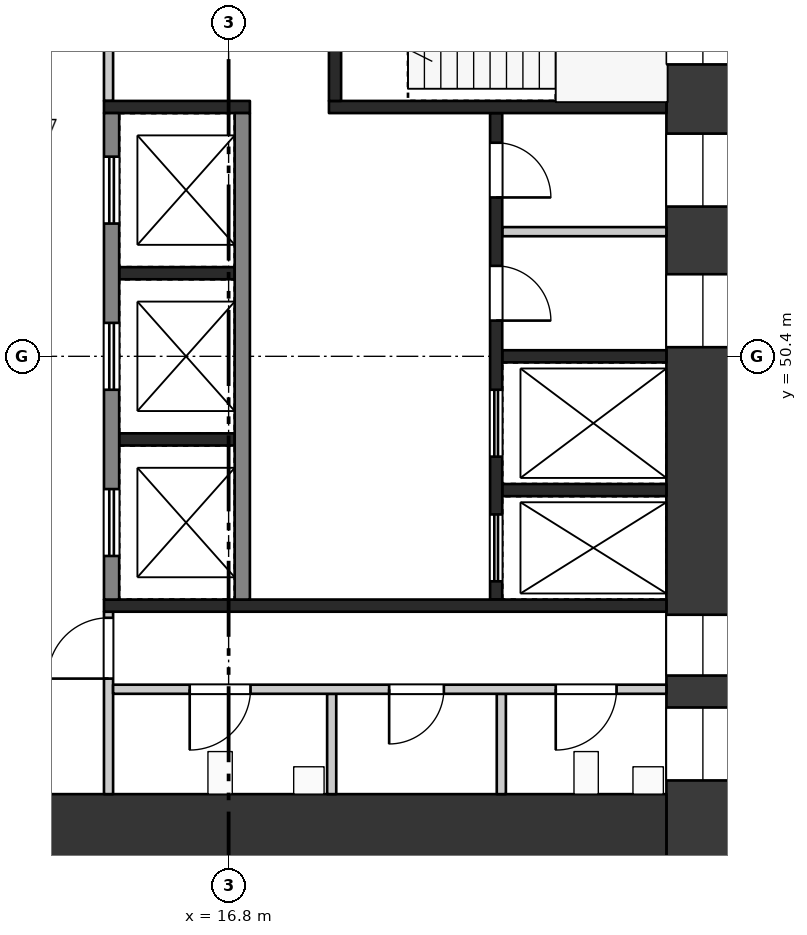
"""IFC4 building model, lengths in metres.
Left out: names, types, materials, properties, quantities, classifications, styles, units other than length and angle.
Written with IfcOpenShell. Run it as: python <this file> out.ifc"""

import sys

from ifc_helpers import new_model, si_unit, direction, frame, frame_2d, origin, place, context, subcontext, project, spatial, rectangle, extrude, element, fill, save


model = new_model("IFC4")
c1 = context("Model", 3, precision=1e-05, world=origin(), true_north=direction((0.0, 1.0)))
c2 = subcontext(c1, "Body", "Model", "MODEL_VIEW")
j1 = project(units=[si_unit("LENGTHUNIT", "METRE"), si_unit("PLANEANGLEUNIT", "RADIAN")], contexts=[c1])
p1 = place(None, origin())
s1 = spatial("IfcSite", under=j1, at=p1, CompositionType="ELEMENT")
p2 = place(p1, origin())
s2 = spatial("IfcBuilding", under=s1, at=p2, CompositionType="ELEMENT")
p3 = place(p2, frame((0.0, 0.0, 224.7)))
s3 = spatial("IfcBuildingStorey", under=s2, at=p3, CompositionType="ELEMENT", Elevation=224.7)
p4 = place(p3, frame((24.6, 58.8, 0.0), z_axis=(0.0, 0.0, 1.0), x_axis=(0.0, -1.0, 0.0)))
e1 = element("IfcWall", 1, at=p4, inside=s3, PredefinedType="SHEAR", context=c2, shape_type="SweptSolid", body=[
    extrude(rectangle(XDim=16.8, YDim=1.2, at=frame_2d((8.4, 0.0))), origin(), (0.0, 0.0, 1.0), 3.22),
])
p5 = place(p4, frame((1.8, 0.0, 0.5)))
e2 = element("IfcOpeningElement", 2, at=p5, cuts=e1, PredefinedType="OPENING", context=c2, shape_type="SweptSolid", body=[
    extrude(rectangle(XDim=1.8, YDim=2.4, at=frame_2d((0.9, 1.2))), frame((0.0, 0.61, 0.0), z_axis=(0.0, -1.0, 0.0), x_axis=(1.0, 0.0, 0.0)), (0.0, 0.0, 1.0), 1.22),
])
p6 = place(p4, frame((4.738, 0.0, 1.6)))
e3 = element("IfcOpeningElement", 3, at=p6, cuts=e1, PredefinedType="OPENING", context=c2, shape_type="SweptSolid", body=[
    extrude(rectangle(XDim=1.2, YDim=1.2, at=frame_2d((0.6, 0.6))), frame((0.0, 0.61, 0.0), z_axis=(0.0, -1.0, 0.0), x_axis=(1.0, 0.0, 0.0)), (0.0, 0.0, 1.0), 1.22),
])
p7 = place(p4, frame((7.05, 0.0, 1.6)))
e4 = element("IfcOpeningElement", 4, at=p7, cuts=e1, PredefinedType="OPENING", context=c2, shape_type="SweptSolid", body=[
    extrude(rectangle(XDim=1.2, YDim=1.2, at=frame_2d((0.6, 0.6))), frame((0.0, 0.61, 0.0), z_axis=(0.0, -1.0, 0.0), x_axis=(1.0, 0.0, 0.0)), (0.0, 0.0, 1.0), 1.22),
])
p8 = place(p4, frame((12.65, 0.0, 0.6)))
e5 = element("IfcOpeningElement", 5, at=p8, cuts=e1, PredefinedType="OPENING", context=c2, shape_type="SweptSolid", body=[
    extrude(rectangle(XDim=1.0, YDim=2.1, at=frame_2d((0.5, 1.05))), frame((0.0, 0.61, 0.0), z_axis=(0.0, -1.0, 0.0), x_axis=(1.0, 0.0, 0.0)), (0.0, 0.0, 1.0), 1.22),
])
p9 = place(p4, frame((14.175, 0.0, 1.6)))
e6 = element("IfcOpeningElement", 6, at=p9, cuts=e1, PredefinedType="OPENING", context=c2, shape_type="SweptSolid", body=[
    extrude(rectangle(XDim=1.2, YDim=1.2, at=frame_2d((0.6, 0.6))), frame((0.0, 0.61, 0.0), z_axis=(0.0, -1.0, 0.0), x_axis=(1.0, 0.0, 0.0)), (0.0, 0.0, 1.0), 1.22),
])
p10 = place(p3, frame((9.6, 42.6, 0.0), z_axis=(0.0, 0.0, 1.0), x_axis=(1.0, 0.0, 0.0)))
e7 = element("IfcWall", 7, at=p10, inside=s3, PredefinedType="SHEAR", context=c2, shape_type="SweptSolid", body=[
    extrude(rectangle(XDim=14.4, YDim=1.2, at=frame_2d((7.2, 0.0))), origin(), (0.0, 0.0, 1.0), 3.22),
])
p11 = place(p10, frame((2.1, 0.0, 0.0)))
e8 = element("IfcOpeningElement", 8, at=p11, cuts=e7, PredefinedType="OPENING", context=c2, shape_type="SweptSolid", body=[
    extrude(rectangle(XDim=1.8, YDim=2.1, at=frame_2d((0.9, 1.05))), frame((0.0, 0.61, 0.0), z_axis=(0.0, -1.0, 0.0), x_axis=(1.0, 0.0, 0.0)), (0.0, 0.0, 1.0), 1.22),
])
for number, where, z_axis, x_axis in (
    (9, (15.0, 51.767, 0.0), (0.0, 0.0, 1.0), (1.0, 0.0, 0.0)),
    (10, (15.0, 49.033, 0.0), (0.0, 0.0, 1.0), (1.0, 0.0, 0.0)),
):
    element("IfcWall", number, at=place(p3, frame(where, z_axis=z_axis, x_axis=x_axis)), inside=s3, PredefinedType="SHEAR", context=c2, shape_type="SweptSolid", body=[
        extrude(rectangle(XDim=1.9, YDim=0.2, at=frame_2d((0.95, 0.0))), origin(), (0.0, 0.0, 1.0), 3.22),
    ])
p12 = place(p3, frame((14.875, 54.4, 0.0), z_axis=(0.0, 0.0, 1.0), x_axis=(0.0, -1.0, 0.0)))
e11 = element("IfcWall", 11, at=p12, inside=s3, PredefinedType="SHEAR", context=c2, shape_type="SweptSolid", body=[
    extrude(rectangle(XDim=8.0, YDim=0.25, at=frame_2d((4.0, 0.0))), origin(), (0.0, 0.0, 1.0), 3.22),
])
p13 = place(p12, frame((0.717, 0.0, 0.0)))
e12 = element("IfcOpeningElement", 12, at=p13, cuts=e11, PredefinedType="OPENING", context=c2, shape_type="SweptSolid", body=[
    extrude(rectangle(XDim=1.1, YDim=2.1, at=frame_2d((0.55, 1.05))), frame((0.0, 0.135, 0.0), z_axis=(0.0, -1.0, 0.0), x_axis=(1.0, 0.0, 0.0)), (0.0, 0.0, 1.0), 0.27),
])
p14 = place(p12, frame((3.45, 0.0, 0.0)))
e13 = element("IfcOpeningElement", 13, at=p14, cuts=e11, PredefinedType="OPENING", context=c2, shape_type="SweptSolid", body=[
    extrude(rectangle(XDim=1.1, YDim=2.1, at=frame_2d((0.55, 1.05))), frame((0.0, 0.135, 0.0), z_axis=(0.0, -1.0, 0.0), x_axis=(1.0, 0.0, 0.0)), (0.0, 0.0, 1.0), 0.27),
])
p15 = place(p12, frame((6.183, 0.0, 0.0)))
e14 = element("IfcOpeningElement", 14, at=p15, cuts=e11, PredefinedType="OPENING", context=c2, shape_type="SweptSolid", body=[
    extrude(rectangle(XDim=1.1, YDim=2.1, at=frame_2d((0.55, 1.05))), frame((0.0, 0.135, 0.0), z_axis=(0.0, -1.0, 0.0), x_axis=(1.0, 0.0, 0.0)), (0.0, 0.0, 1.0), 0.27),
])
p16 = place(p3, frame((17.025, 54.4, 0.0), z_axis=(0.0, 0.0, 1.0), x_axis=(0.0, -1.0, 0.0)))
e15 = element("IfcWall", 15, at=p16, inside=s3, PredefinedType="SHEAR", context=c2, shape_type="SweptSolid", body=[
    extrude(rectangle(XDim=8.0, YDim=0.25, at=frame_2d((4.0, 0.0))), origin(), (0.0, 0.0, 1.0), 3.22),
])
for number, where, z_axis, x_axis in (
    (16, (21.3, 50.4, 0.0), (0.0, 0.0, 1.0), (1.0, 0.0, 0.0)),
    (17, (21.3, 48.2, 0.0), (0.0, 0.0, 1.0), (1.0, 0.0, 0.0)),
):
    element("IfcWall", number, at=place(p3, frame(where, z_axis=z_axis, x_axis=x_axis)), inside=s3, PredefinedType="SHEAR", context=c2, shape_type="SweptSolid", body=[
        extrude(rectangle(XDim=2.7, YDim=0.2, at=frame_2d((1.35, 0.0))), origin(), (0.0, 0.0, 1.0), 3.22),
    ])
p17 = place(p3, frame((21.3, 52.45, 0.0), z_axis=(0.0, 0.0, 1.0), x_axis=(1.0, 0.0, 0.0)))
e18 = element("IfcWall", 18, at=p17, inside=s3, PredefinedType="PARTITIONING", context=c2, shape_type="SweptSolid", body=[
    extrude(rectangle(XDim=2.7, YDim=0.15, at=frame_2d((1.35, 0.0))), origin(), (0.0, 0.0, 1.0), 3.22),
])
p18 = place(p3, frame((21.2, 54.4, 0.0), z_axis=(0.0, 0.0, 1.0), x_axis=(0.0, -1.0, 0.0)))
e19 = element("IfcWall", 19, at=p18, inside=s3, PredefinedType="SHEAR", context=c2, shape_type="SweptSolid", body=[
    extrude(rectangle(XDim=8.0, YDim=0.2, at=frame_2d((4.0, 0.0))), origin(), (0.0, 0.0, 1.0), 3.22),
])
p19 = place(p18, frame((0.488, 0.0, 0.0)))
e20 = element("IfcOpeningElement", 20, at=p19, cuts=e19, PredefinedType="OPENING", context=c2, shape_type="SweptSolid", body=[
    extrude(rectangle(XDim=0.9, YDim=2.1, at=frame_2d((0.45, 1.05))), frame((0.0, 0.11, 0.0), z_axis=(0.0, -1.0, 0.0), x_axis=(1.0, 0.0, 0.0)), (0.0, 0.0, 1.0), 0.22),
])
p20 = place(p18, frame((2.512, 0.0, 0.0)))
e21 = element("IfcOpeningElement", 21, at=p20, cuts=e19, PredefinedType="OPENING", context=c2, shape_type="SweptSolid", body=[
    extrude(rectangle(XDim=0.9, YDim=2.1, at=frame_2d((0.45, 1.05))), frame((0.0, 0.11, 0.0), z_axis=(0.0, -1.0, 0.0), x_axis=(1.0, 0.0, 0.0)), (0.0, 0.0, 1.0), 0.22),
])
p21 = place(p18, frame((4.55, 0.0, 0.0)))
e22 = element("IfcOpeningElement", 22, at=p21, cuts=e19, PredefinedType="OPENING", context=c2, shape_type="SweptSolid", body=[
    extrude(rectangle(XDim=1.1, YDim=2.1, at=frame_2d((0.55, 1.05))), frame((0.0, 0.11, 0.0), z_axis=(0.0, -1.0, 0.0), x_axis=(1.0, 0.0, 0.0)), (0.0, 0.0, 1.0), 0.22),
])
p22 = place(p18, frame((6.6, 0.0, 0.0)))
e23 = element("IfcOpeningElement", 23, at=p22, cuts=e19, PredefinedType="OPENING", context=c2, shape_type="SweptSolid", body=[
    extrude(rectangle(XDim=1.1, YDim=2.1, at=frame_2d((0.55, 1.05))), frame((0.0, 0.11, 0.0), z_axis=(0.0, -1.0, 0.0), x_axis=(1.0, 0.0, 0.0)), (0.0, 0.0, 1.0), 0.22),
])
p23 = place(p3, frame((14.75, 54.5, 0.0), z_axis=(0.0, 0.0, 1.0), x_axis=(1.0, 0.0, 0.0)))
e24 = element("IfcWall", 24, at=p23, inside=s3, PredefinedType="SHEAR", context=c2, shape_type="SweptSolid", body=[
    extrude(rectangle(XDim=2.4, YDim=0.2, at=frame_2d((1.2, 0.0))), origin(), (0.0, 0.0, 1.0), 3.22),
])
p24 = place(p3, frame((18.45, 54.5, 0.0), z_axis=(0.0, 0.0, 1.0), x_axis=(1.0, 0.0, 0.0)))
e25 = element("IfcWall", 25, at=p24, inside=s3, PredefinedType="SHEAR", context=c2, shape_type="SweptSolid", body=[
    extrude(rectangle(XDim=5.55, YDim=0.2, at=frame_2d((2.775, 0.0))), origin(), (0.0, 0.0, 1.0), 3.22),
])
p25 = place(p3, frame((14.825, 57.6, 0.0), z_axis=(0.0, 0.0, 1.0), x_axis=(0.0, -1.0, 0.0)))
e26 = element("IfcWall", 26, at=p25, inside=s3, PredefinedType="PARTITIONING", context=c2, shape_type="SweptSolid", body=[
    extrude(rectangle(XDim=3.0, YDim=0.15, at=frame_2d((1.5, 0.0))), origin(), (0.0, 0.0, 1.0), 3.22),
])
p26 = place(p25, frame((1.0, 0.0, 0.0)))
e27 = element("IfcOpeningElement", 27, at=p26, cuts=e26, PredefinedType="OPENING", context=c2, shape_type="SweptSolid", body=[
    extrude(rectangle(XDim=1.0, YDim=2.1, at=frame_2d((0.5, 1.05))), frame((0.0, 0.085, 0.0), z_axis=(0.0, -1.0, 0.0), x_axis=(1.0, 0.0, 0.0)), (0.0, 0.0, 1.0), 0.17),
])
p27 = place(p3, frame((18.55, 57.6, 0.0), z_axis=(0.0, 0.0, 1.0), x_axis=(0.0, -1.0, 0.0)))
e28 = element("IfcWall", 28, at=p27, inside=s3, PredefinedType="SHEAR", context=c2, shape_type="SweptSolid", body=[
    extrude(rectangle(XDim=3.0, YDim=0.2, at=frame_2d((1.5, 0.0))), origin(), (0.0, 0.0, 1.0), 3.22),
])
p28 = place(p27, frame((1.0, 0.0, 0.0)))
e29 = element("IfcOpeningElement", 29, at=p28, cuts=e28, PredefinedType="OPENING", context=c2, shape_type="SweptSolid", body=[
    extrude(rectangle(XDim=1.0, YDim=2.1, at=frame_2d((0.5, 1.05))), frame((0.0, 0.11, 0.0), z_axis=(0.0, -1.0, 0.0), x_axis=(1.0, 0.0, 0.0)), (0.0, 0.0, 1.0), 0.22),
])
p29 = place(p3, frame((14.75, 46.3, 0.0), z_axis=(0.0, 0.0, 1.0), x_axis=(1.0, 0.0, 0.0)))
e30 = element("IfcWall", 30, at=p29, inside=s3, PredefinedType="SHEAR", context=c2, shape_type="SweptSolid", body=[
    extrude(rectangle(XDim=9.25, YDim=0.2, at=frame_2d((4.625, 0.0))), origin(), (0.0, 0.0, 1.0), 3.22),
])
p30 = place(p3, frame((14.825, 46.2, 0.0), z_axis=(0.0, 0.0, 1.0), x_axis=(0.0, -1.0, 0.0)))
e31 = element("IfcWall", 31, at=p30, inside=s3, PredefinedType="PARTITIONING", context=c2, shape_type="SweptSolid", body=[
    extrude(rectangle(XDim=3.0, YDim=0.15, at=frame_2d((1.5, 0.0))), origin(), (0.0, 0.0, 1.0), 3.22),
])
p31 = place(p30, frame((0.1, 0.0, 0.0)))
e32 = element("IfcOpeningElement", 32, at=p31, cuts=e31, PredefinedType="OPENING", context=c2, shape_type="SweptSolid", body=[
    extrude(rectangle(XDim=1.0, YDim=2.1, at=frame_2d((0.5, 1.05))), frame((0.0, 0.085, 0.0), z_axis=(0.0, -1.0, 0.0), x_axis=(1.0, 0.0, 0.0)), (0.0, 0.0, 1.0), 0.17),
])
for number, where, z_axis, x_axis in (
    (33, (18.495, 44.85, 0.0), (0.0, 0.0, 1.0), (0.0, -1.0, 0.0)),
    (34, (21.285, 44.85, 0.0), (0.0, 0.0, 1.0), (0.0, -1.0, 0.0)),
):
    element("IfcWall", number, at=place(p3, frame(where, z_axis=z_axis, x_axis=x_axis)), inside=s3, PredefinedType="PARTITIONING", context=c2, shape_type="SweptSolid", body=[
        extrude(rectangle(XDim=1.65, YDim=0.15, at=frame_2d((0.825, 0.0))), origin(), (0.0, 0.0, 1.0), 3.22),
    ])
p32 = place(p3, frame((14.9, 44.925, 0.0), z_axis=(0.0, 0.0, 1.0), x_axis=(1.0, 0.0, 0.0)))
e35 = element("IfcWall", 35, at=p32, inside=s3, PredefinedType="PARTITIONING", context=c2, shape_type="SweptSolid", body=[
    extrude(rectangle(XDim=9.1, YDim=0.15, at=frame_2d((4.55, 0.0))), origin(), (0.0, 0.0, 1.0), 3.22),
])
p33 = place(p32, frame((1.26, 0.0, 0.0)))
e36 = element("IfcOpeningElement", 36, at=p33, cuts=e35, PredefinedType="OPENING", context=c2, shape_type="SweptSolid", body=[
    extrude(rectangle(XDim=1.0, YDim=2.1, at=frame_2d((0.5, 1.05))), frame((0.0, 0.085, 0.0), z_axis=(0.0, -1.0, 0.0), x_axis=(1.0, 0.0, 0.0)), (0.0, 0.0, 1.0), 0.17),
])
p34 = place(p32, frame((4.54, 0.0, 0.0)))
e37 = element("IfcOpeningElement", 37, at=p34, cuts=e35, PredefinedType="OPENING", context=c2, shape_type="SweptSolid", body=[
    extrude(rectangle(XDim=0.9, YDim=2.1, at=frame_2d((0.45, 1.05))), frame((0.0, 0.085, 0.0), z_axis=(0.0, -1.0, 0.0), x_axis=(1.0, 0.0, 0.0)), (0.0, 0.0, 1.0), 0.17),
])
p35 = place(p32, frame((7.28, 0.0, 0.0)))
e38 = element("IfcOpeningElement", 38, at=p35, cuts=e35, PredefinedType="OPENING", context=c2, shape_type="SweptSolid", body=[
    extrude(rectangle(XDim=1.0, YDim=2.1, at=frame_2d((0.5, 1.05))), frame((0.0, 0.085, 0.0), z_axis=(0.0, -1.0, 0.0), x_axis=(1.0, 0.0, 0.0)), (0.0, 0.0, 1.0), 0.17),
])
p36 = place(p13, origin())
e39 = element("IfcDoor", 39, at=p36, inside=s3, OperationType="DOUBLE_DOOR_SLIDING", PredefinedType="DOOR", context=c2, shape_type="SweptSolid", body=[
    extrude(rectangle(XDim=1.1, YDim=2.1, at=frame_2d((0.55, 1.05))), frame((0.0, 0.025, 0.0), z_axis=(0.0, -1.0, 0.0), x_axis=(1.0, 0.0, 0.0)), (0.0, 0.0, 1.0), 0.05),
])
fill(e12, e39)
p37 = place(p14, origin())
e40 = element("IfcDoor", 40, at=p37, inside=s3, OperationType="DOUBLE_DOOR_SLIDING", PredefinedType="DOOR", context=c2, shape_type="SweptSolid", body=[
    extrude(rectangle(XDim=1.1, YDim=2.1, at=frame_2d((0.55, 1.05))), frame((0.0, 0.025, 0.0), z_axis=(0.0, -1.0, 0.0), x_axis=(1.0, 0.0, 0.0)), (0.0, 0.0, 1.0), 0.05),
])
fill(e13, e40)
p38 = place(p15, origin())
e41 = element("IfcDoor", 41, at=p38, inside=s3, OperationType="DOUBLE_DOOR_SLIDING", PredefinedType="DOOR", context=c2, shape_type="SweptSolid", body=[
    extrude(rectangle(XDim=1.1, YDim=2.1, at=frame_2d((0.55, 1.05))), frame((0.0, 0.025, 0.0), z_axis=(0.0, -1.0, 0.0), x_axis=(1.0, 0.0, 0.0)), (0.0, 0.0, 1.0), 0.05),
])
fill(e14, e41)
p39 = place(p19, origin())
e42 = element("IfcDoor", 42, at=p39, inside=s3, OperationType="SINGLE_SWING_RIGHT", PredefinedType="DOOR", context=c2, shape_type="SweptSolid", body=[
    extrude(rectangle(XDim=0.9, YDim=2.1, at=frame_2d((0.45, 1.05))), frame((0.0, 0.025, 0.0), z_axis=(0.0, -1.0, 0.0), x_axis=(1.0, 0.0, 0.0)), (0.0, 0.0, 1.0), 0.05),
])
fill(e20, e42)
p40 = place(p20, origin())
e43 = element("IfcDoor", 43, at=p40, inside=s3, OperationType="SINGLE_SWING_RIGHT", PredefinedType="DOOR", context=c2, shape_type="SweptSolid", body=[
    extrude(rectangle(XDim=0.9, YDim=2.1, at=frame_2d((0.45, 1.05))), frame((0.0, 0.025, 0.0), z_axis=(0.0, -1.0, 0.0), x_axis=(1.0, 0.0, 0.0)), (0.0, 0.0, 1.0), 0.05),
])
fill(e21, e43)
p41 = place(p21, origin())
e44 = element("IfcDoor", 44, at=p41, inside=s3, OperationType="DOUBLE_DOOR_SLIDING", PredefinedType="DOOR", context=c2, shape_type="SweptSolid", body=[
    extrude(rectangle(XDim=1.1, YDim=2.1, at=frame_2d((0.55, 1.05))), frame((0.0, 0.025, 0.0), z_axis=(0.0, -1.0, 0.0), x_axis=(1.0, 0.0, 0.0)), (0.0, 0.0, 1.0), 0.05),
])
fill(e22, e44)
p42 = place(p22, origin())
e45 = element("IfcDoor", 45, at=p42, inside=s3, OperationType="DOUBLE_DOOR_SLIDING", PredefinedType="DOOR", context=c2, shape_type="SweptSolid", body=[
    extrude(rectangle(XDim=1.1, YDim=2.1, at=frame_2d((0.55, 1.05))), frame((0.0, 0.025, 0.0), z_axis=(0.0, -1.0, 0.0), x_axis=(1.0, 0.0, 0.0)), (0.0, 0.0, 1.0), 0.05),
])
fill(e23, e45)
p43 = place(p31, frame((1.0, 0.0, 0.0), z_axis=(0.0, 0.0, 1.0), x_axis=(-1.0, 0.0, 0.0)))
e46 = element("IfcDoor", 46, at=p43, inside=s3, OperationType="SINGLE_SWING_LEFT", PredefinedType="DOOR", context=c2, shape_type="SweptSolid", body=[
    extrude(rectangle(XDim=1.0, YDim=2.1, at=frame_2d((0.5, 1.05))), frame((0.0, 0.025, 0.0), z_axis=(0.0, -1.0, 0.0), x_axis=(1.0, 0.0, 0.0)), (0.0, 0.0, 1.0), 0.05),
])
fill(e32, e46)
p44 = place(p33, frame((1.0, 0.0, 0.0), z_axis=(0.0, 0.0, 1.0), x_axis=(-1.0, 0.0, 0.0)))
e47 = element("IfcDoor", 47, at=p44, inside=s3, OperationType="SINGLE_SWING_RIGHT", PredefinedType="DOOR", context=c2, shape_type="SweptSolid", body=[
    extrude(rectangle(XDim=1.0, YDim=2.1, at=frame_2d((0.5, 1.05))), frame((0.0, 0.025, 0.0), z_axis=(0.0, -1.0, 0.0), x_axis=(1.0, 0.0, 0.0)), (0.0, 0.0, 1.0), 0.05),
])
fill(e36, e47)
p45 = place(p34, frame((0.9, 0.0, 0.0), z_axis=(0.0, 0.0, 1.0), x_axis=(-1.0, 0.0, 0.0)))
e48 = element("IfcDoor", 48, at=p45, inside=s3, OperationType="SINGLE_SWING_RIGHT", PredefinedType="DOOR", context=c2, shape_type="SweptSolid", body=[
    extrude(rectangle(XDim=0.9, YDim=2.1, at=frame_2d((0.45, 1.05))), frame((0.0, 0.025, 0.0), z_axis=(0.0, -1.0, 0.0), x_axis=(1.0, 0.0, 0.0)), (0.0, 0.0, 1.0), 0.05),
])
fill(e37, e48)
p46 = place(p35, frame((1.0, 0.0, 0.0), z_axis=(0.0, 0.0, 1.0), x_axis=(-1.0, 0.0, 0.0)))
e49 = element("IfcDoor", 49, at=p46, inside=s3, OperationType="SINGLE_SWING_RIGHT", PredefinedType="DOOR", context=c2, shape_type="SweptSolid", body=[
    extrude(rectangle(XDim=1.0, YDim=2.1, at=frame_2d((0.5, 1.05))), frame((0.0, 0.025, 0.0), z_axis=(0.0, -1.0, 0.0), x_axis=(1.0, 0.0, 0.0)), (0.0, 0.0, 1.0), 0.05),
])
fill(e38, e49)
p47 = place(p5, origin())
e50 = element("IfcWindow", 50, at=p47, inside=s3, PartitioningType="SINGLE_PANEL", PredefinedType="WINDOW", context=c2, shape_type="SweptSolid", body=[
    extrude(rectangle(XDim=1.8, YDim=2.4, at=frame_2d((0.9, 1.2))), frame((0.0, 0.03, 0.0), z_axis=(0.0, -1.0, 0.0), x_axis=(1.0, 0.0, 0.0)), (0.0, 0.0, 1.0), 0.06),
])
fill(e2, e50)
p48 = place(p6, origin())
e51 = element("IfcWindow", 51, at=p48, inside=s3, PartitioningType="SINGLE_PANEL", PredefinedType="WINDOW", context=c2, shape_type="SweptSolid", body=[
    extrude(rectangle(XDim=1.2, YDim=1.2, at=frame_2d((0.6, 0.6))), frame((0.0, 0.03, 0.0), z_axis=(0.0, -1.0, 0.0), x_axis=(1.0, 0.0, 0.0)), (0.0, 0.0, 1.0), 0.06),
])
fill(e3, e51)
p49 = place(p7, origin())
e52 = element("IfcWindow", 52, at=p49, inside=s3, PartitioningType="SINGLE_PANEL", PredefinedType="WINDOW", context=c2, shape_type="SweptSolid", body=[
    extrude(rectangle(XDim=1.2, YDim=1.2, at=frame_2d((0.6, 0.6))), frame((0.0, 0.03, 0.0), z_axis=(0.0, -1.0, 0.0), x_axis=(1.0, 0.0, 0.0)), (0.0, 0.0, 1.0), 0.06),
])
fill(e4, e52)
p50 = place(p8, origin())
e53 = element("IfcWindow", 53, at=p50, inside=s3, PartitioningType="SINGLE_PANEL", PredefinedType="WINDOW", context=c2, shape_type="SweptSolid", body=[
    extrude(rectangle(XDim=1.0, YDim=2.1, at=frame_2d((0.5, 1.05))), frame((0.0, 0.03, 0.0), z_axis=(0.0, -1.0, 0.0), x_axis=(1.0, 0.0, 0.0)), (0.0, 0.0, 1.0), 0.06),
])
fill(e5, e53)
p51 = place(p9, origin())
e54 = element("IfcWindow", 54, at=p51, inside=s3, PartitioningType="SINGLE_PANEL", PredefinedType="WINDOW", context=c2, shape_type="SweptSolid", body=[
    extrude(rectangle(XDim=1.2, YDim=1.2, at=frame_2d((0.6, 0.6))), frame((0.0, 0.03, 0.0), z_axis=(0.0, -1.0, 0.0), x_axis=(1.0, 0.0, 0.0)), (0.0, 0.0, 1.0), 0.06),
])
fill(e6, e54)
save(model, sys.argv[1])
